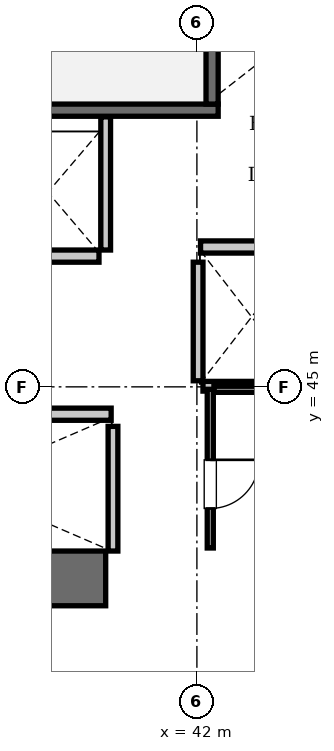
"""IFC4 building model, lengths in metres.
Left out: names, types, materials, properties, quantities, classifications, styles, units other than length and angle.
Written with IfcOpenShell. Run it as: python <this file> out.ifc"""

import sys

from ifc_helpers import new_model, si_unit, direction, frame, frame_2d, origin, place, context, subcontext, project, spatial, rectangle, extrude, element, fill, save


model = new_model("IFC4")
c1 = context("Model", 3, precision=1e-05, world=origin(), true_north=direction((0.0, 1.0)))
c2 = subcontext(c1, "Body", "Model", "MODEL_VIEW")
j1 = project(units=[si_unit("LENGTHUNIT", "METRE"), si_unit("PLANEANGLEUNIT", "RADIAN")], contexts=[c1])
p1 = place(None, origin())
s1 = spatial("IfcSite", under=j1, at=p1, CompositionType="ELEMENT")
p2 = place(p1, origin())
s2 = spatial("IfcBuilding", under=s1, at=p2, CompositionType="ELEMENT")
p3 = place(p2, frame((0.0, 0.0, 5.6)))
s3 = spatial("IfcBuildingStorey", under=s2, at=p3, CompositionType="ELEMENT", Elevation=5.6)
p4 = place(p3, frame((35.1, 41.85, 0.0), z_axis=(0.0, 0.0, 1.0), x_axis=(1.0, 0.0, 0.0)))
e1 = element("IfcWall", 1, at=p4, inside=s3, PredefinedType="SHEAR", context=c2, shape_type="SweptSolid", body=[
    extrude(rectangle(XDim=5.4, YDim=0.9, at=frame_2d((2.7, 0.0))), origin(), (0.0, 0.0, 1.0), 5.25),
])
p5 = place(p3, frame((33.25, 49.55, 0.0), z_axis=(0.0, 0.0, 1.0), x_axis=(1.0, 0.0, 0.0)))
e2 = element("IfcWall", 2, at=p5, inside=s3, PredefinedType="SOLIDWALL", context=c2, shape_type="SweptSolid", body=[
    extrude(rectangle(XDim=9.1, YDim=0.2, at=frame_2d((4.55, 0.0))), origin(), (0.0, 0.0, 1.0), 4.97),
])
p6 = place(p3, frame((42.25, 49.65, 0.0), z_axis=(0.0, 0.0, 1.0), x_axis=(0.0, 1.0, 0.0)))
e3 = element("IfcWall", 3, at=p6, inside=s3, PredefinedType="SOLIDWALL", context=c2, shape_type="SweptSolid", body=[
    extrude(rectangle(XDim=3.45, YDim=0.2, at=frame_2d((1.725, 0.0))), origin(), (0.0, 0.0, 1.0), 4.97),
])
p7 = place(p3, frame((42.06, 47.3, 0.0), z_axis=(0.0, 0.0, 1.0), x_axis=(1.0, 0.0, 0.0)))
e4 = element("IfcWall", 4, at=p7, inside=s3, PredefinedType="SOLIDWALL", context=c2, shape_type="SweptSolid", body=[
    extrude(rectangle(XDim=1.68, YDim=0.2, at=frame_2d((0.84, 0.0))), origin(), (0.0, 0.0, 1.0), 4.97),
])
p8 = place(p3, frame((38.91, 44.55, 0.0), z_axis=(0.0, 0.0, 1.0), x_axis=(1.0, 0.0, 0.0)))
e5 = element("IfcWall", 5, at=p8, inside=s3, PredefinedType="SOLIDWALL", context=c2, shape_type="SweptSolid", body=[
    extrude(rectangle(XDim=1.68, YDim=0.2, at=frame_2d((0.84, 0.0))), origin(), (0.0, 0.0, 1.0), 4.97),
])
p9 = place(p3, frame((38.71, 47.15, 0.0), z_axis=(0.0, 0.0, 1.0), x_axis=(1.0, 0.0, 0.0)))
e6 = element("IfcWall", 6, at=p9, inside=s3, PredefinedType="SOLIDWALL", context=c2, shape_type="SweptSolid", body=[
    extrude(rectangle(XDim=1.68, YDim=0.2, at=frame_2d((0.84, 0.0))), origin(), (0.0, 0.0, 1.0), 4.97),
])
p10 = place(p3, frame((42.02, 45.1, 0.0), z_axis=(0.0, 0.0, 1.0), x_axis=(0.0, 1.0, 0.0)))
e7 = element("IfcWall", 7, at=p10, inside=s3, PredefinedType="SOLIDWALL", context=c2, shape_type="SweptSolid", body=[
    extrude(rectangle(XDim=1.95, YDim=0.16, at=frame_2d((0.975, 0.0))), origin(), (0.0, 0.0, 1.0), 4.97),
])
p11 = place(p3, frame((42.1, 45.01, 0.0), z_axis=(0.0, 0.0, 1.0), x_axis=(1.0, 0.0, 0.0)))
e8 = element("IfcWall", 8, at=p11, inside=s3, PredefinedType="SOLIDWALL", context=c2, shape_type="SweptSolid", body=[
    extrude(rectangle(XDim=3.45, YDim=0.16, at=frame_2d((1.725, 0.0))), origin(), (0.0, 0.0, 1.0), 4.97),
])
p12 = place(p3, frame((40.62, 42.3, 0.0), z_axis=(0.0, 0.0, 1.0), x_axis=(0.0, 1.0, 0.0)))
e9 = element("IfcWall", 9, at=p12, inside=s3, PredefinedType="SOLIDWALL", context=c2, shape_type="SweptSolid", body=[
    extrude(rectangle(XDim=2.05, YDim=0.16, at=frame_2d((1.025, 0.0))), origin(), (0.0, 0.0, 1.0), 4.97),
])
p13 = place(p3, frame((40.5, 47.25, 0.0), z_axis=(0.0, 0.0, 1.0), x_axis=(0.0, 1.0, 0.0)))
e10 = element("IfcWall", 10, at=p13, inside=s3, PredefinedType="SOLIDWALL", context=c2, shape_type="SweptSolid", body=[
    extrude(rectangle(XDim=2.19, YDim=0.16, at=frame_2d((1.095, 0.0))), origin(), (0.0, 0.0, 1.0), 4.97),
])
p14 = place(p3, frame((42.22, 42.35, 0.0), z_axis=(0.0, 0.0, 1.0), x_axis=(0.0, 1.0, 0.0)))
e11 = element("IfcWall", 11, at=p14, inside=s3, PredefinedType="PARTITIONING", context=c2, shape_type="SweptSolid", body=[
    extrude(rectangle(XDim=2.61, YDim=0.1, at=frame_2d((1.305, 0.0))), origin(), (0.0, 0.0, 1.0), 4.97),
])
p15 = place(p14, frame((0.65, 0.0, 0.0)))
e12 = element("IfcOpeningElement", 12, at=p15, cuts=e11, PredefinedType="OPENING", context=c2, shape_type="SweptSolid", body=[
    extrude(rectangle(XDim=0.8, YDim=2.05, at=frame_2d((0.4, 1.025))), frame((0.0, 0.06, 0.0), z_axis=(0.0, -1.0, 0.0), x_axis=(1.0, 0.0, 0.0)), (0.0, 0.0, 1.0), 0.12),
])
p16 = place(p3, frame((42.28, 44.96, 0.0), z_axis=(0.0, 0.0, 1.0), x_axis=(1.0, 0.0, 0.0)))
e13 = element("IfcWall", 13, at=p16, inside=s3, PredefinedType="PARTITIONING", context=c2, shape_type="SweptSolid", body=[
    extrude(rectangle(XDim=1.3, YDim=0.1, at=frame_2d((0.65, 0.0))), origin(), (0.0, 0.0, 1.0), 4.97),
])
p17 = place(p15, frame((0.8, 0.0, 0.0), z_axis=(0.0, 0.0, 1.0), x_axis=(-1.0, 0.0, 0.0)))
e14 = element("IfcDoor", 14, at=p17, inside=s3, OperationType="SINGLE_SWING_LEFT", PredefinedType="DOOR", context=c2, shape_type="SweptSolid", body=[
    extrude(rectangle(XDim=0.8, YDim=2.05, at=frame_2d((0.4, 1.025))), frame((0.0, 0.025, 0.0), z_axis=(0.0, -1.0, 0.0), x_axis=(1.0, 0.0, 0.0)), (0.0, 0.0, 1.0), 0.05),
])
fill(e12, e14)
save(model, sys.argv[1])
